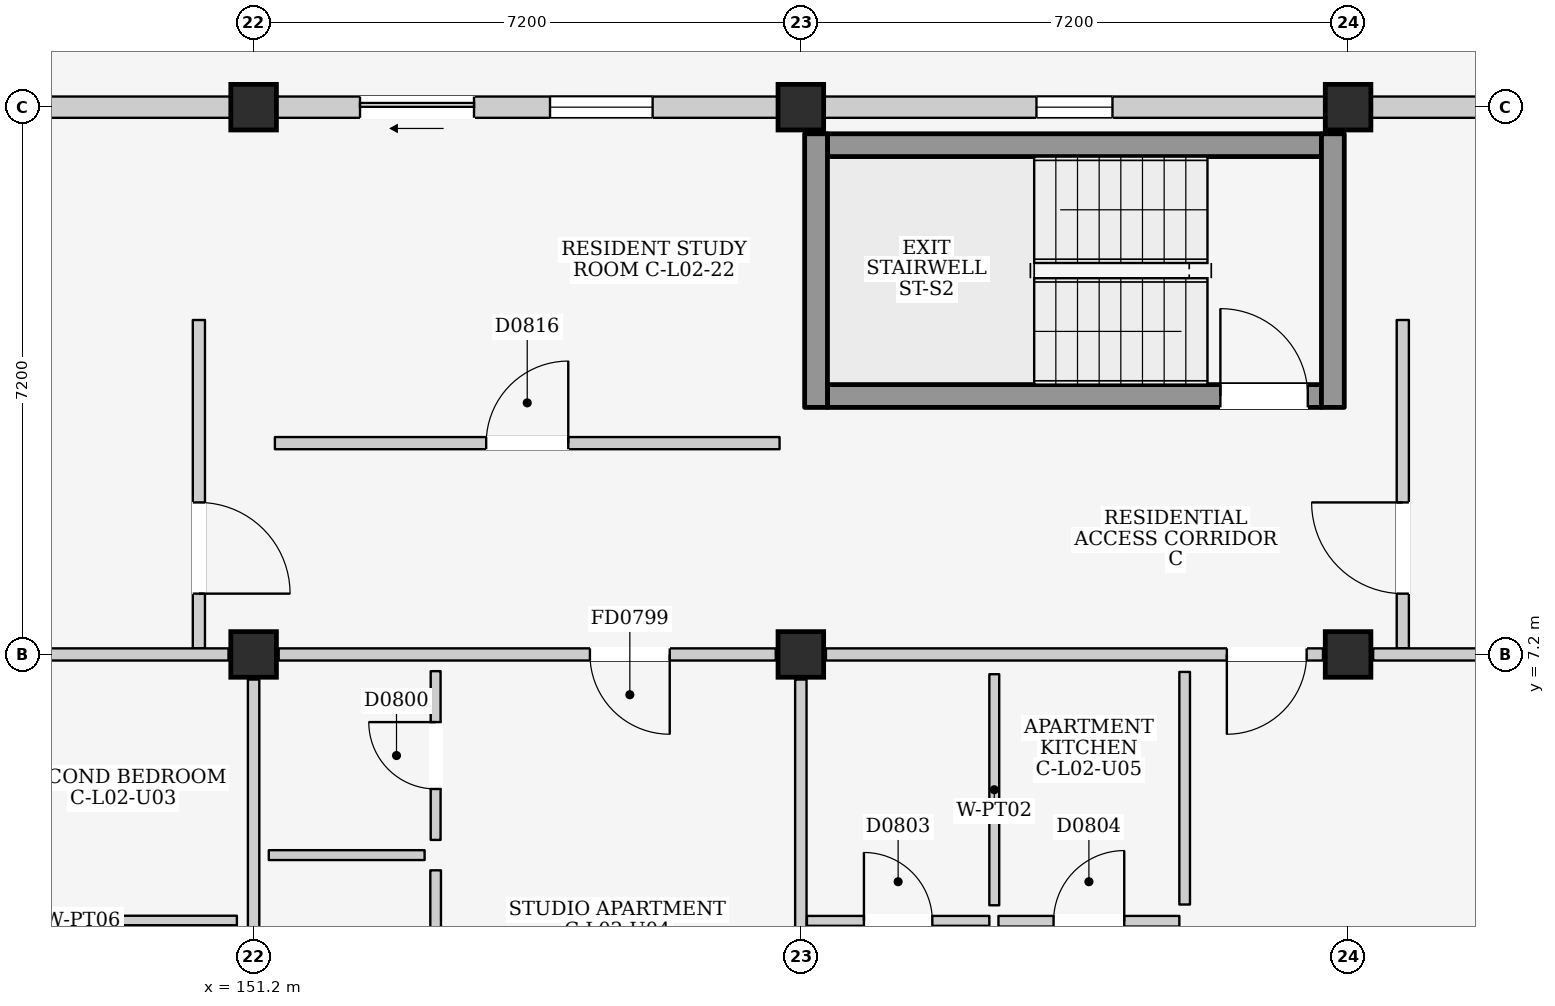
"""IFC4 building model, lengths in metres.
Left out: names, types, materials, properties, quantities, classifications, styles, units other than length and angle.
Written with IfcOpenShell. Run it as: python <this file> out.ifc"""

import sys

from ifc_helpers import new_model, si_unit, direction, frame, frame_2d, origin, origin_2d, place, context, subcontext, project, spatial, rectangle, extrude, element, fill, save


model = new_model("IFC4")
c1 = context("Model", 3, precision=1e-05, world=origin(), true_north=direction((0.0, 1.0)))
c2 = subcontext(c1, "Body", "Model", "MODEL_VIEW")
j1 = project(units=[si_unit("LENGTHUNIT", "METRE"), si_unit("PLANEANGLEUNIT", "RADIAN")], contexts=[c1])
p1 = place(None, origin())
s1 = spatial("IfcSite", under=j1, at=p1, CompositionType="ELEMENT")
p2 = place(p1, origin())
s2 = spatial("IfcBuilding", under=s1, at=p2, CompositionType="ELEMENT")
p3 = place(p2, frame((0.0, 0.0, 9.0)))
s3 = spatial("IfcBuildingStorey", under=s2, at=p3, CompositionType="ELEMENT", Elevation=9.0)
for number, where, z_axis, x_axis in (
    (1, (151.2, 7.2, 0.0), (0.0, 0.0, 1.0), (1.0, 0.0, 0.0)),
    (2, (151.2, 14.4, 0.0), (0.0, 0.0, 1.0), (1.0, 0.0, 0.0)),
    (3, (158.4, 7.2, 0.0), (0.0, 0.0, 1.0), (1.0, 0.0, 0.0)),
    (4, (158.4, 14.4, 0.0), (0.0, 0.0, 1.0), (1.0, 0.0, 0.0)),
    (5, (165.6, 7.2, 0.0), (0.0, 0.0, 1.0), (1.0, 0.0, 0.0)),
    (6, (165.6, 14.4, 0.0), (0.0, 0.0, 1.0), (1.0, 0.0, 0.0)),
):
    element("IfcColumn", number, at=place(p3, frame(where, z_axis=z_axis, x_axis=x_axis)), inside=s3, PredefinedType="COLUMN", context=c2, shape_type="SweptSolid", body=[
        extrude(rectangle(XDim=0.6, YDim=0.6, at=origin_2d()), origin(), (0.0, 0.0, 1.0), 3.2),
    ])
p4 = place(p3, frame((144.3, 14.4, 0.0), z_axis=(0.0, 0.0, 1.0), x_axis=(1.0, 0.0, 0.0)))
e7 = element("IfcWall", 7, at=p4, inside=s3, PredefinedType="ELEMENTEDWALL", context=c2, shape_type="SweptSolid", body=[
    extrude(rectangle(XDim=6.6, YDim=0.28, at=frame_2d((3.3, 0.0))), origin(), (0.0, 0.0, 1.0), 2.345),
])
p5 = place(p4, frame((2.8, 0.0, 1.2)))
e8 = element("IfcOpeningElement", 8, at=p5, cuts=e7, PredefinedType="OPENING", context=c2, shape_type="SweptSolid", body=[
    extrude(rectangle(XDim=1.0, YDim=0.9, at=frame_2d((0.5, 0.45))), frame((0.0, 0.155, 0.0), z_axis=(0.0, -1.0, 0.0), x_axis=(1.0, 0.0, 0.0)), (0.0, 0.0, 1.0), 0.31),
])
p6 = place(p3, frame((151.5, 14.4, 0.0), z_axis=(0.0, 0.0, 1.0), x_axis=(1.0, 0.0, 0.0)))
e9 = element("IfcWall", 9, at=p6, inside=s3, PredefinedType="ELEMENTEDWALL", context=c2, shape_type="SweptSolid", body=[
    extrude(rectangle(XDim=6.6, YDim=0.28, at=frame_2d((3.3, 0.0))), origin(), (0.0, 0.0, 1.0), 2.345),
])
p7 = place(p6, frame((1.1, 0.0, 0.0)))
e10 = element("IfcOpeningElement", 10, at=p7, cuts=e9, PredefinedType="OPENING", context=c2, shape_type="SweptSolid", body=[
    extrude(rectangle(XDim=1.5, YDim=2.12, at=frame_2d((0.75, 1.06))), frame((0.0, 0.155, 0.0), z_axis=(0.0, -1.0, 0.0), x_axis=(1.0, 0.0, 0.0)), (0.0, 0.0, 1.0), 0.31),
])
p8 = place(p6, frame((3.6, 0.0, 0.735)))
e11 = element("IfcOpeningElement", 11, at=p8, cuts=e9, PredefinedType="OPENING", context=c2, shape_type="SweptSolid", body=[
    extrude(rectangle(XDim=1.35, YDim=1.5, at=frame_2d((0.675, 0.75))), frame((0.0, 0.155, 0.0), z_axis=(0.0, -1.0, 0.0), x_axis=(1.0, 0.0, 0.0)), (0.0, 0.0, 1.0), 0.31),
])
p9 = place(p3, frame((158.7, 14.4, 0.0), z_axis=(0.0, 0.0, 1.0), x_axis=(1.0, 0.0, 0.0)))
e12 = element("IfcWall", 12, at=p9, inside=s3, PredefinedType="ELEMENTEDWALL", context=c2, shape_type="SweptSolid", body=[
    extrude(rectangle(XDim=6.6, YDim=0.28, at=frame_2d((3.3, 0.0))), origin(), (0.0, 0.0, 1.0), 2.345),
])
p10 = place(p9, frame((2.8, 0.0, 1.2)))
e13 = element("IfcOpeningElement", 13, at=p10, cuts=e12, PredefinedType="OPENING", context=c2, shape_type="SweptSolid", body=[
    extrude(rectangle(XDim=1.0, YDim=0.9, at=frame_2d((0.5, 0.45))), frame((0.0, 0.155, 0.0), z_axis=(0.0, -1.0, 0.0), x_axis=(1.0, 0.0, 0.0)), (0.0, 0.0, 1.0), 0.31),
])
p11 = place(p3, frame((165.9, 14.4, 0.0), z_axis=(0.0, 0.0, 1.0), x_axis=(1.0, 0.0, 0.0)))
e14 = element("IfcWall", 14, at=p11, inside=s3, PredefinedType="ELEMENTEDWALL", context=c2, shape_type="SweptSolid", body=[
    extrude(rectangle(XDim=6.6, YDim=0.28, at=frame_2d((3.3, 0.0))), origin(), (0.0, 0.0, 1.0), 2.345),
])
p12 = place(p11, frame((2.8, 0.0, 1.2)))
e15 = element("IfcOpeningElement", 15, at=p12, cuts=e14, PredefinedType="OPENING", context=c2, shape_type="SweptSolid", body=[
    extrude(rectangle(XDim=1.0, YDim=0.9, at=frame_2d((0.5, 0.45))), frame((0.0, 0.155, 0.0), z_axis=(0.0, -1.0, 0.0), x_axis=(1.0, 0.0, 0.0)), (0.0, 0.0, 1.0), 0.31),
])
p13 = place(p3, frame((150.48, 7.28, 0.0), z_axis=(0.0, 0.0, 1.0), x_axis=(0.0, 1.0, 0.0)))
e16 = element("IfcWall", 16, at=p13, inside=s3, PredefinedType="PARTITIONING", context=c2, shape_type="SweptSolid", body=[
    extrude(rectangle(XDim=4.32, YDim=0.16, at=frame_2d((2.16, 0.0))), origin(), (0.0, 0.0, 1.0), 2.96),
])
p14 = place(p13, frame((0.72, 0.0, 0.0)))
e17 = element("IfcOpeningElement", 17, at=p14, cuts=e16, PredefinedType="OPENING", context=c2, shape_type="SweptSolid", body=[
    extrude(rectangle(XDim=1.2, YDim=2.2, at=frame_2d((0.6, 1.1))), frame((0.0, 0.095, 0.0), z_axis=(0.0, -1.0, 0.0), x_axis=(1.0, 0.0, 0.0)), (0.0, 0.0, 1.0), 0.19),
])
p15 = place(p3, frame((158.75, 10.6, 0.0), z_axis=(0.0, 0.0, 1.0), x_axis=(1.0, 0.0, 0.0)))
e18 = element("IfcWall", 18, at=p15, inside=s3, PredefinedType="SHEAR", context=c2, shape_type="SweptSolid", body=[
    extrude(rectangle(XDim=6.5, YDim=0.3, at=frame_2d((3.25, 0.0))), origin(), (0.0, 0.0, 1.0), 2.96),
])
p16 = place(p15, frame((5.17, 0.0, 0.0)))
e19 = element("IfcOpeningElement", 19, at=p16, cuts=e18, PredefinedType="OPENING", context=c2, shape_type="SweptSolid", body=[
    extrude(rectangle(XDim=1.15, YDim=2.2, at=frame_2d((0.575, 1.1))), frame((0.0, 0.165, 0.0), z_axis=(0.0, -1.0, 0.0), x_axis=(1.0, 0.0, 0.0)), (0.0, 0.0, 1.0), 0.33),
])
p17 = place(p3, frame((158.75, 13.9, 0.0), z_axis=(0.0, 0.0, 1.0), x_axis=(1.0, 0.0, 0.0)))
e20 = element("IfcWall", 20, at=p17, inside=s3, PredefinedType="SHEAR", context=c2, shape_type="SweptSolid", body=[
    extrude(rectangle(XDim=6.5, YDim=0.3, at=frame_2d((3.25, 0.0))), origin(), (0.0, 0.0, 1.0), 2.96),
])
for number, where, z_axis, x_axis in (
    (21, (158.6, 10.45, 0.0), (0.0, 0.0, 1.0), (0.0, 1.0, 0.0)),
    (22, (165.4, 10.45, 0.0), (0.0, 0.0, 1.0), (0.0, 1.0, 0.0)),
):
    element("IfcWall", number, at=place(p3, frame(where, z_axis=z_axis, x_axis=x_axis)), inside=s3, PredefinedType="SHEAR", context=c2, shape_type="SweptSolid", body=[
        extrude(rectangle(XDim=3.6, YDim=0.3, at=frame_2d((1.8, 0.0))), origin(), (0.0, 0.0, 1.0), 2.96),
    ])
p18 = place(p3, frame((166.32, 7.28, 0.0), z_axis=(0.0, 0.0, 1.0), x_axis=(0.0, 1.0, 0.0)))
e23 = element("IfcWall", 23, at=p18, inside=s3, PredefinedType="PARTITIONING", context=c2, shape_type="SweptSolid", body=[
    extrude(rectangle(XDim=4.32, YDim=0.16, at=frame_2d((2.16, 0.0))), origin(), (0.0, 0.0, 1.0), 2.96),
])
p19 = place(p18, frame((0.72, 0.0, 0.0)))
e24 = element("IfcOpeningElement", 24, at=p19, cuts=e23, PredefinedType="OPENING", context=c2, shape_type="SweptSolid", body=[
    extrude(rectangle(XDim=1.2, YDim=2.2, at=frame_2d((0.6, 1.1))), frame((0.0, 0.095, 0.0), z_axis=(0.0, -1.0, 0.0), x_axis=(1.0, 0.0, 0.0)), (0.0, 0.0, 1.0), 0.19),
])
p20 = place(p3, frame((144.33, 7.2, 0.0), z_axis=(0.0, 0.0, 1.0), x_axis=(1.0, 0.0, 0.0)))
e25 = element("IfcWall", 25, at=p20, inside=s3, PredefinedType="PARTITIONING", context=c2, shape_type="SweptSolid", body=[
    extrude(rectangle(XDim=6.54, YDim=0.16, at=frame_2d((3.27, 0.0))), origin(), (0.0, 0.0, 1.0), 2.345),
])
p21 = place(p3, frame((151.2, 0.33, 0.0), z_axis=(0.0, 0.0, 1.0), x_axis=(0.0, 1.0, 0.0)))
e26 = element("IfcWall", 26, at=p21, inside=s3, PredefinedType="PARTITIONING", context=c2, shape_type="SweptSolid", body=[
    extrude(rectangle(XDim=6.54, YDim=0.15, at=frame_2d((3.27, 0.0))), origin(), (0.0, 0.0, 1.0), 2.395),
])
p22 = place(p3, frame((146.92, 3.7, 0.0), z_axis=(0.0, 0.0, 1.0), x_axis=(1.0, 0.0, 0.0)))
e27 = element("IfcWall", 27, at=p22, inside=s3, PredefinedType="PARTITIONING", context=c2, shape_type="SweptSolid", body=[
    extrude(rectangle(XDim=4.06, YDim=0.125, at=frame_2d((2.03, 0.0))), origin(), (0.0, 0.0, 1.0), 2.96),
])
p23 = place(p3, frame((151.53, 7.2, 0.0), z_axis=(0.0, 0.0, 1.0), x_axis=(1.0, 0.0, 0.0)))
e28 = element("IfcWall", 28, at=p23, inside=s3, PredefinedType="PARTITIONING", context=c2, shape_type="SweptSolid", body=[
    extrude(rectangle(XDim=6.54, YDim=0.16, at=frame_2d((3.27, 0.0))), origin(), (0.0, 0.0, 1.0), 2.345),
])
p24 = place(p23, frame((4.095, 0.0, 0.0)))
e29 = element("IfcOpeningElement", 29, at=p24, cuts=e28, PredefinedType="OPENING", context=c2, shape_type="SweptSolid", body=[
    extrude(rectangle(XDim=1.05, YDim=2.15, at=frame_2d((0.525, 1.075))), frame((0.0, 0.095, 0.0), z_axis=(0.0, -1.0, 0.0), x_axis=(1.0, 0.0, 0.0)), (0.0, 0.0, 1.0), 0.19),
])
p25 = place(p3, frame((158.4, 0.33, 0.0), z_axis=(0.0, 0.0, 1.0), x_axis=(0.0, 1.0, 0.0)))
e30 = element("IfcWall", 30, at=p25, inside=s3, PredefinedType="PARTITIONING", context=c2, shape_type="SweptSolid", body=[
    extrude(rectangle(XDim=6.54, YDim=0.15, at=frame_2d((3.27, 0.0))), origin(), (0.0, 0.0, 1.0), 2.395),
])
p26 = place(p3, frame((151.4, 4.56, 0.0), z_axis=(0.0, 0.0, 1.0), x_axis=(1.0, 0.0, 0.0)))
e31 = element("IfcWall", 31, at=p26, inside=s3, PredefinedType="PARTITIONING", context=c2, shape_type="SweptSolid", body=[
    extrude(rectangle(XDim=2.05, YDim=0.13, at=frame_2d((1.025, 0.0))), origin(), (0.0, 0.0, 1.0), 2.96),
])
p27 = place(p3, frame((153.595, 4.76, 0.0), z_axis=(0.0, 0.0, 1.0), x_axis=(0.0, 1.0, 0.0)))
e32 = element("IfcWall", 32, at=p27, inside=s3, PredefinedType="PARTITIONING", context=c2, shape_type="SweptSolid", body=[
    extrude(rectangle(XDim=2.22, YDim=0.13, at=frame_2d((1.11, 0.0))), origin(), (0.0, 0.0, 1.0), 2.96),
])
p28 = place(p27, frame((0.67, 0.0, 0.0)))
e33 = element("IfcOpeningElement", 33, at=p28, cuts=e32, PredefinedType="OPENING", context=c2, shape_type="SweptSolid", body=[
    extrude(rectangle(XDim=0.88, YDim=2.1, at=frame_2d((0.44, 1.05))), frame((0.0, 0.08, 0.0), z_axis=(0.0, -1.0, 0.0), x_axis=(1.0, 0.0, 0.0)), (0.0, 0.0, 1.0), 0.16),
])
p29 = place(p3, frame((153.595, 0.42, 0.0), z_axis=(0.0, 0.0, 1.0), x_axis=(0.0, 1.0, 0.0)))
e34 = element("IfcWall", 34, at=p29, inside=s3, PredefinedType="PARTITIONING", context=c2, shape_type="SweptSolid", body=[
    extrude(rectangle(XDim=3.94, YDim=0.14, at=frame_2d((1.97, 0.0))), origin(), (0.0, 0.0, 1.0), 2.96),
])
p30 = place(p29, frame((1.505, 0.0, 0.0)))
e35 = element("IfcOpeningElement", 35, at=p30, cuts=e34, PredefinedType="OPENING", context=c2, shape_type="SweptSolid", body=[
    extrude(rectangle(XDim=0.93, YDim=2.14, at=frame_2d((0.465, 1.07))), frame((0.0, 0.085, 0.0), z_axis=(0.0, -1.0, 0.0), x_axis=(1.0, 0.0, 0.0)), (0.0, 0.0, 1.0), 0.17),
])
p31 = place(p3, frame((158.73, 7.2, 0.0), z_axis=(0.0, 0.0, 1.0), x_axis=(1.0, 0.0, 0.0)))
e36 = element("IfcWall", 36, at=p31, inside=s3, PredefinedType="PARTITIONING", context=c2, shape_type="SweptSolid", body=[
    extrude(rectangle(XDim=6.54, YDim=0.16, at=frame_2d((3.27, 0.0))), origin(), (0.0, 0.0, 1.0), 2.345),
])
p32 = place(p31, frame((5.275, 0.0, 0.0)))
e37 = element("IfcOpeningElement", 37, at=p32, cuts=e36, PredefinedType="OPENING", context=c2, shape_type="SweptSolid", body=[
    extrude(rectangle(XDim=1.05, YDim=2.15, at=frame_2d((0.525, 1.075))), frame((0.0, 0.095, 0.0), z_axis=(0.0, -1.0, 0.0), x_axis=(1.0, 0.0, 0.0)), (0.0, 0.0, 1.0), 0.19),
])
p33 = place(p3, frame((165.93, 7.2, 0.0), z_axis=(0.0, 0.0, 1.0), x_axis=(1.0, 0.0, 0.0)))
e38 = element("IfcWall", 38, at=p33, inside=s3, PredefinedType="PARTITIONING", context=c2, shape_type="SweptSolid", body=[
    extrude(rectangle(XDim=6.54, YDim=0.16, at=frame_2d((3.27, 0.0))), origin(), (0.0, 0.0, 1.0), 2.345),
])
p34 = place(p3, frame((158.48, 3.695, 0.0), z_axis=(0.0, 0.0, 1.0), x_axis=(1.0, 0.0, 0.0)))
e39 = element("IfcWall", 39, at=p34, inside=s3, PredefinedType="PARTITIONING", context=c2, shape_type="SweptSolid", body=[
    extrude(rectangle(XDim=2.4, YDim=0.13, at=frame_2d((1.2, 0.0))), origin(), (0.0, 0.0, 1.0), 2.96),
])
p35 = place(p34, frame((0.75, 0.0, 0.0)))
e40 = element("IfcOpeningElement", 40, at=p35, cuts=e39, PredefinedType="OPENING", context=c2, shape_type="SweptSolid", body=[
    extrude(rectangle(XDim=0.9, YDim=2.1, at=frame_2d((0.45, 1.05))), frame((0.0, 0.08, 0.0), z_axis=(0.0, -1.0, 0.0), x_axis=(1.0, 0.0, 0.0)), (0.0, 0.0, 1.0), 0.16),
])
p36 = place(p3, frame((160.945, 3.9, 0.0), z_axis=(0.0, 0.0, 1.0), x_axis=(0.0, 1.0, 0.0)))
e41 = element("IfcWall", 41, at=p36, inside=s3, PredefinedType="PARTITIONING", context=c2, shape_type="SweptSolid", body=[
    extrude(rectangle(XDim=3.04, YDim=0.13, at=frame_2d((1.52, 0.0))), origin(), (0.0, 0.0, 1.0), 2.96),
])
p37 = place(p3, frame((161.0, 3.69, 0.0), z_axis=(0.0, 0.0, 1.0), x_axis=(1.0, 0.0, 0.0)))
e42 = element("IfcWall", 42, at=p37, inside=s3, PredefinedType="PARTITIONING", context=c2, shape_type="SweptSolid", body=[
    extrude(rectangle(XDim=2.38, YDim=0.14, at=frame_2d((1.19, 0.0))), origin(), (0.0, 0.0, 1.0), 2.96),
])
p38 = place(p37, frame((0.725, 0.0, 0.0)))
e43 = element("IfcOpeningElement", 43, at=p38, cuts=e42, PredefinedType="OPENING", context=c2, shape_type="SweptSolid", body=[
    extrude(rectangle(XDim=0.93, YDim=2.14, at=frame_2d((0.465, 1.07))), frame((0.0, 0.085, 0.0), z_axis=(0.0, -1.0, 0.0), x_axis=(1.0, 0.0, 0.0)), (0.0, 0.0, 1.0), 0.17),
])
p39 = place(p3, frame((163.45, 3.91, 0.0), z_axis=(0.0, 0.0, 1.0), x_axis=(0.0, 1.0, 0.0)))
e44 = element("IfcWall", 44, at=p39, inside=s3, PredefinedType="PARTITIONING", context=c2, shape_type="SweptSolid", body=[
    extrude(rectangle(XDim=3.06, YDim=0.14, at=frame_2d((1.53, 0.0))), origin(), (0.0, 0.0, 1.0), 2.96),
])
p40 = place(p3, frame((151.48, 9.98, 0.0), z_axis=(0.0, 0.0, 1.0), x_axis=(1.0, 0.0, 0.0)))
e45 = element("IfcWall", 45, at=p40, inside=s3, PredefinedType="PARTITIONING", context=c2, shape_type="SweptSolid", body=[
    extrude(rectangle(XDim=6.64, YDim=0.16, at=frame_2d((3.32, 0.0))), origin(), (0.0, 0.0, 1.0), 2.96),
])
p41 = place(p40, frame((2.78, 0.0, 0.0)))
e46 = element("IfcOpeningElement", 46, at=p41, cuts=e45, PredefinedType="OPENING", context=c2, shape_type="SweptSolid", body=[
    extrude(rectangle(XDim=1.08, YDim=2.22, at=frame_2d((0.54, 1.11))), frame((0.0, 0.095, 0.0), z_axis=(0.0, -1.0, 0.0), x_axis=(1.0, 0.0, 0.0)), (0.0, 0.0, 1.0), 0.19),
])
p42 = place(p7, frame((1.5, 0.0, 0.0), z_axis=(0.0, 0.0, 1.0), x_axis=(-1.0, 0.0, 0.0)))
e47 = element("IfcDoor", 47, at=p42, inside=s3, OperationType="SLIDING_TO_LEFT", PredefinedType="DOOR", context=c2, shape_type="SweptSolid", body=[
    extrude(rectangle(XDim=1.5, YDim=2.12, at=frame_2d((0.75, 1.06))), frame((0.0, 0.025, 0.0), z_axis=(0.0, -1.0, 0.0), x_axis=(1.0, 0.0, 0.0)), (0.0, 0.0, 1.0), 0.05),
])
fill(e10, e47)
p43 = place(p8, origin())
e48 = element("IfcWindow", 48, at=p43, inside=s3, PartitioningType="SINGLE_PANEL", PredefinedType="WINDOW", context=c2, shape_type="SweptSolid", body=[
    extrude(rectangle(XDim=1.35, YDim=1.5, at=frame_2d((0.675, 0.75))), frame((0.0, 0.03, 0.0), z_axis=(0.0, -1.0, 0.0), x_axis=(1.0, 0.0, 0.0)), (0.0, 0.0, 1.0), 0.06),
])
fill(e11, e48)
p44 = place(p10, origin())
e49 = element("IfcWindow", 49, at=p44, inside=s3, PartitioningType="SINGLE_PANEL", PredefinedType="WINDOW", context=c2, shape_type="SweptSolid", body=[
    extrude(rectangle(XDim=1.0, YDim=0.9, at=frame_2d((0.5, 0.45))), frame((0.0, 0.03, 0.0), z_axis=(0.0, -1.0, 0.0), x_axis=(1.0, 0.0, 0.0)), (0.0, 0.0, 1.0), 0.06),
])
fill(e13, e49)
p45 = place(p14, frame((1.2, 0.0, 0.0), z_axis=(0.0, 0.0, 1.0), x_axis=(-1.0, 0.0, 0.0)))
e50 = element("IfcDoor", 50, at=p45, inside=s3, OperationType="SINGLE_SWING_RIGHT", PredefinedType="DOOR", context=c2, shape_type="SweptSolid", body=[
    extrude(rectangle(XDim=1.2, YDim=2.2, at=frame_2d((0.6, 1.1))), frame((0.0, 0.025, 0.0), z_axis=(0.0, -1.0, 0.0), x_axis=(1.0, 0.0, 0.0)), (0.0, 0.0, 1.0), 0.05),
])
fill(e17, e50)
p46 = place(p16, origin())
e51 = element("IfcDoor", 51, at=p46, inside=s3, OperationType="SINGLE_SWING_LEFT", PredefinedType="DOOR", context=c2, shape_type="SweptSolid", body=[
    extrude(rectangle(XDim=1.15, YDim=2.2, at=frame_2d((0.575, 1.1))), frame((0.0, 0.025, 0.0), z_axis=(0.0, -1.0, 0.0), x_axis=(1.0, 0.0, 0.0)), (0.0, 0.0, 1.0), 0.05),
])
fill(e19, e51)
p47 = place(p19, origin())
e52 = element("IfcDoor", 52, at=p47, inside=s3, OperationType="SINGLE_SWING_RIGHT", PredefinedType="DOOR", context=c2, shape_type="SweptSolid", body=[
    extrude(rectangle(XDim=1.2, YDim=2.2, at=frame_2d((0.6, 1.1))), frame((0.0, 0.025, 0.0), z_axis=(0.0, -1.0, 0.0), x_axis=(1.0, 0.0, 0.0)), (0.0, 0.0, 1.0), 0.05),
])
fill(e24, e52)
p48 = place(p24, frame((1.05, 0.0, 0.0), z_axis=(0.0, 0.0, 1.0), x_axis=(-1.0, 0.0, 0.0)))
e53 = element("IfcDoor", 53, at=p48, inside=s3, OperationType="SINGLE_SWING_LEFT", PredefinedType="DOOR", context=c2, shape_type="SweptSolid", body=[
    extrude(rectangle(XDim=1.05, YDim=2.15, at=frame_2d((0.525, 1.075))), frame((0.0, 0.025, 0.0), z_axis=(0.0, -1.0, 0.0), x_axis=(1.0, 0.0, 0.0)), (0.0, 0.0, 1.0), 0.05),
])
fill(e29, e53)
p49 = place(p28, origin())
e54 = element("IfcDoor", 54, at=p49, inside=s3, OperationType="SINGLE_SWING_RIGHT", PredefinedType="DOOR", context=c2, shape_type="SweptSolid", body=[
    extrude(rectangle(XDim=0.88, YDim=2.1, at=frame_2d((0.44, 1.05))), frame((0.0, 0.025, 0.0), z_axis=(0.0, -1.0, 0.0), x_axis=(1.0, 0.0, 0.0)), (0.0, 0.0, 1.0), 0.05),
])
fill(e33, e54)
p50 = place(p32, frame((1.05, 0.0, 0.0), z_axis=(0.0, 0.0, 1.0), x_axis=(-1.0, 0.0, 0.0)))
e55 = element("IfcDoor", 55, at=p50, inside=s3, OperationType="SINGLE_SWING_RIGHT", PredefinedType="DOOR", context=c2, shape_type="SweptSolid", body=[
    extrude(rectangle(XDim=1.05, YDim=2.15, at=frame_2d((0.525, 1.075))), frame((0.0, 0.025, 0.0), z_axis=(0.0, -1.0, 0.0), x_axis=(1.0, 0.0, 0.0)), (0.0, 0.0, 1.0), 0.05),
])
fill(e37, e55)
p51 = place(p35, origin())
e56 = element("IfcDoor", 56, at=p51, inside=s3, OperationType="SINGLE_SWING_LEFT", PredefinedType="DOOR", context=c2, shape_type="SweptSolid", body=[
    extrude(rectangle(XDim=0.9, YDim=2.1, at=frame_2d((0.45, 1.05))), frame((0.0, 0.025, 0.0), z_axis=(0.0, -1.0, 0.0), x_axis=(1.0, 0.0, 0.0)), (0.0, 0.0, 1.0), 0.05),
])
fill(e40, e56)
p52 = place(p38, origin())
e57 = element("IfcDoor", 57, at=p52, inside=s3, OperationType="SINGLE_SWING_RIGHT", PredefinedType="DOOR", context=c2, shape_type="SweptSolid", body=[
    extrude(rectangle(XDim=0.93, YDim=2.14, at=frame_2d((0.465, 1.07))), frame((0.0, 0.025, 0.0), z_axis=(0.0, -1.0, 0.0), x_axis=(1.0, 0.0, 0.0)), (0.0, 0.0, 1.0), 0.05),
])
fill(e43, e57)
p53 = place(p41, origin())
e58 = element("IfcDoor", 58, at=p53, inside=s3, OperationType="SINGLE_SWING_RIGHT", PredefinedType="DOOR", context=c2, shape_type="SweptSolid", body=[
    extrude(rectangle(XDim=1.08, YDim=2.22, at=frame_2d((0.54, 1.11))), frame((0.0, 0.025, 0.0), z_axis=(0.0, -1.0, 0.0), x_axis=(1.0, 0.0, 0.0)), (0.0, 0.0, 1.0), 0.05),
])
fill(e46, e58)
save(model, sys.argv[1])
